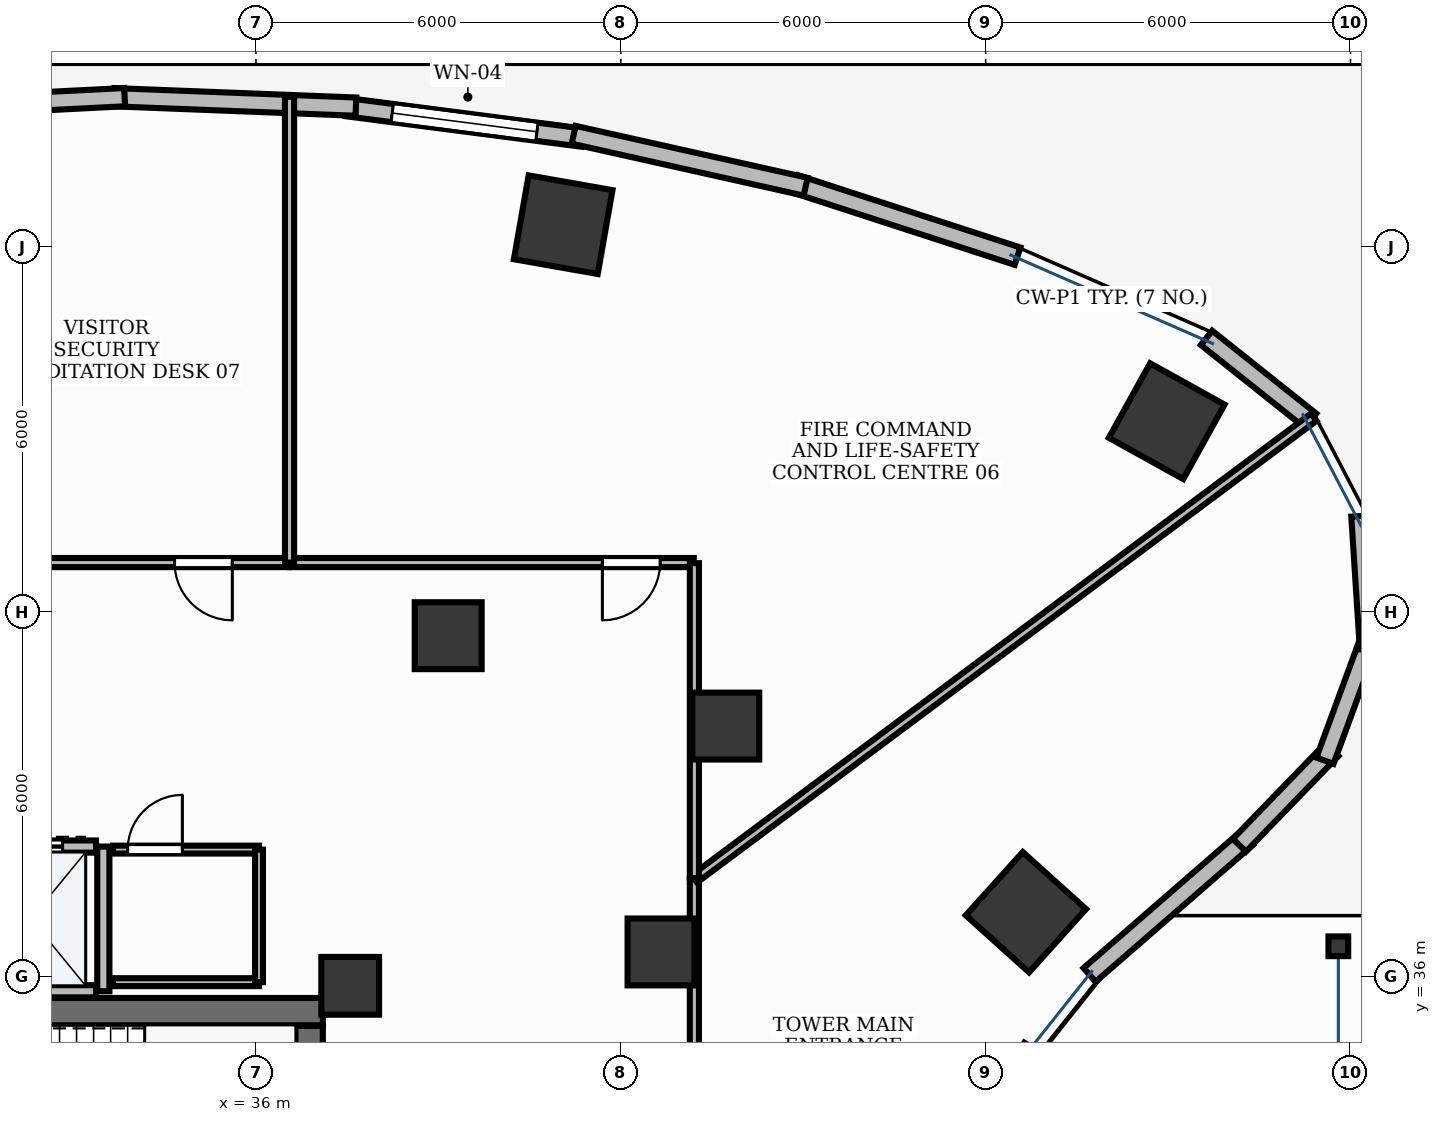
"""IFC4 building model, lengths in metres.
Left out: names, types, materials, properties, quantities, classifications, styles, units other than length and angle.
Written with IfcOpenShell. Run it as: python <this file> out.ifc"""

import sys

from ifc_helpers import new_model, si_unit, direction, frame, frame_2d, origin, origin_2d, place, context, subcontext, project, spatial, rectangle, hollow_circle, extrude, element, fill, save


model = new_model("IFC4")
c1 = context("Model", 3, precision=1e-05, world=origin(), true_north=direction((0.0, 1.0)))
c2 = subcontext(c1, "Body", "Model", "MODEL_VIEW")
j1 = project(units=[si_unit("LENGTHUNIT", "METRE"), si_unit("PLANEANGLEUNIT", "RADIAN")], contexts=[c1])
p1 = place(None, origin())
s1 = spatial("IfcSite", under=j1, at=p1, CompositionType="ELEMENT")
p2 = place(p1, origin())
s2 = spatial("IfcBuilding", under=s1, at=p2, CompositionType="ELEMENT")
p3 = place(p2, origin())
s3 = spatial("IfcBuildingStorey", under=s2, at=p3, CompositionType="ELEMENT", Elevation=0.0)
p4 = place(p3, frame((28.852, 35.425, 0.0), z_axis=(0.0, 0.0, 1.0), x_axis=(1.0, 0.0, 0.0)))
e1 = element("IfcWall", 1, at=p4, inside=s3, PredefinedType="SHEAR", context=c2, shape_type="SweptSolid", body=[
    extrude(rectangle(XDim=8.248, YDim=0.45, at=frame_2d((4.124, 0.0))), origin(), (0.0, 0.0, 1.0), 5.1),
])
p5 = place(p3, frame((36.875, 32.11, 0.0), z_axis=(0.0, 0.0, 1.0), x_axis=(0.0, 1.0, 0.0)))
e2 = element("IfcWall", 2, at=p5, inside=s3, PredefinedType="SHEAR", context=c2, shape_type="SweptSolid", body=[
    extrude(rectangle(XDim=3.08, YDim=0.45, at=frame_2d((1.54, 0.0))), origin(), (0.0, 0.0, 1.0), 5.1),
])
p6 = place(p3, frame((37.55, 35.85, -0.0), z_axis=(0.0, 0.0, 1.0), x_axis=(1.0, 0.0, 0.0)))
e3 = element("IfcColumn", 3, at=p6, inside=s3, PredefinedType="PILASTER", context=c2, shape_type="SweptSolid", body=[
    extrude(rectangle(XDim=0.95, YDim=0.95, at=origin_2d()), origin(), (0.0, 0.0, 1.0), 5.101),
])
p7 = place(p3, frame((50.977, 45.135, -0.0), z_axis=(0.0, 0.0, 1.0), x_axis=(-0.874535078577, 0.484962262797, 0.0)))
e4 = element("IfcColumn", 4, at=p7, inside=s3, PredefinedType="COLUMN", context=c2, shape_type="SweptSolid", body=[
    extrude(rectangle(XDim=1.4, YDim=1.4, at=origin_2d()), origin(), (0.0, 0.0, 1.0), 5.101),
])
p8 = place(p3, frame((43.727, 40.121, -0.0), z_axis=(0.0, 0.0, 1.0), x_axis=(1.0, 0.0, 0.0)))
e5 = element("IfcColumn", 5, at=p8, inside=s3, PredefinedType="COLUMN", context=c2, shape_type="SweptSolid", body=[
    extrude(rectangle(XDim=1.1, YDim=1.1, at=origin_2d()), origin(), (0.0, 0.0, 1.0), 5.101),
])
p9 = place(p3, frame((41.052, 48.367, -0.0), z_axis=(0.0, 0.0, 1.0), x_axis=(-0.984868307662, 0.173304404339, 0.0)))
e6 = element("IfcColumn", 6, at=p9, inside=s3, PredefinedType="COLUMN", context=c2, shape_type="SweptSolid", body=[
    extrude(rectangle(XDim=1.4, YDim=1.4, at=origin_2d()), origin(), (0.0, 0.0, 1.0), 5.101),
])
p10 = place(p3, frame((39.161, 41.608, -0.0), z_axis=(0.0, 0.0, 1.0), x_axis=(1.0, 0.0, 0.0)))
e7 = element("IfcColumn", 7, at=p10, inside=s3, PredefinedType="COLUMN", context=c2, shape_type="SweptSolid", body=[
    extrude(rectangle(XDim=1.1, YDim=1.1, at=origin_2d()), origin(), (0.0, 0.0, 1.0), 5.101),
])
p11 = place(p3, frame((48.662, 37.061, -0.0), z_axis=(0.0, 0.0, 1.0), x_axis=(0.669130606359, 0.743144825477, 0.0)))
e8 = element("IfcColumn", 8, at=p11, inside=s3, PredefinedType="COLUMN", context=c2, shape_type="SweptSolid", body=[
    extrude(rectangle(XDim=1.4, YDim=1.4, at=origin_2d()), origin(), (0.0, 0.0, 1.0), 5.101),
])
p12 = place(p3, frame((42.662, 36.407, -0.0), z_axis=(0.0, 0.0, 1.0), x_axis=(1.0, 0.0, 0.0)))
e9 = element("IfcColumn", 9, at=p12, inside=s3, PredefinedType="COLUMN", context=c2, shape_type="SweptSolid", body=[
    extrude(rectangle(XDim=1.1, YDim=1.1, at=origin_2d()), origin(), (0.0, 0.0, 1.0), 5.101),
])
p13 = place(p3, frame((53.8, 36.5, -0.0), z_axis=(0.0, 0.0, 1.0), x_axis=(1.0, 0.0, 0.0)))
e10 = element("IfcColumn", 10, at=p13, inside=s3, PredefinedType="COLUMN", context=c2, shape_type="SweptSolid", body=[
    extrude(hollow_circle(Radius=0.162, WallThickness=0.016, at=origin_2d()), origin(), (0.0, 0.0, 1.0), 5.081),
])
p14 = place(p3, frame((41.373, 49.798, 0.0), z_axis=(0.0, 0.0, 1.0), x_axis=(-0.991741322416, 0.128254237408, 0.0)))
e11 = element("IfcWall", 11, at=p14, inside=s3, PredefinedType="STANDARD", context=c2, shape_type="SweptSolid", body=[
    extrude(rectangle(XDim=3.916, YDim=0.3, at=frame_2d((1.958, 0.0))), origin(), (0.0, 0.0, 1.0), 5.1),
])
p15 = place(p14, frame((0.758, 0.0, 1.5)))
e12 = element("IfcOpeningElement", 12, at=p15, cuts=e11, PredefinedType="OPENING", context=c2, shape_type="SweptSolid", body=[
    extrude(rectangle(XDim=2.4, YDim=1.2, at=frame_2d((1.2, 0.6))), frame((0.0, 0.165, 0.0), z_axis=(0.0, -1.0, 0.0), x_axis=(1.0, 0.0, 0.0)), (0.0, 0.0, 1.0), 0.33),
])
p16 = place(p3, frame((48.525, 47.849, 0.0), z_axis=(0.0, 0.0, 1.0), x_axis=(-0.950965833732, 0.309295947393, 0.0)))
e13 = element("IfcWall", 13, at=p16, inside=s3, PredefinedType="STANDARD", context=c2, shape_type="SweptSolid", body=[
    extrude(rectangle(XDim=3.84, YDim=0.3, at=frame_2d((1.92, 0.0))), origin(), (0.0, 0.0, 1.0), 5.1),
])
p17 = place(p3, frame((45.04, 48.991, 0.0), z_axis=(0.0, 0.0, 1.0), x_axis=(-0.975868573345, 0.218358713032, 0.0)))
e14 = element("IfcWall", 14, at=p17, inside=s3, PredefinedType="STANDARD", context=c2, shape_type="SweptSolid", body=[
    extrude(rectangle(XDim=3.909, YDim=0.3, at=frame_2d((1.954, 0.0))), origin(), (0.0, 0.0, 1.0), 5.1),
])
p18 = place(p3, frame((37.644, 50.308, 0.0), z_axis=(0.0, 0.0, 1.0), x_axis=(-0.999245411623, 0.038840794937, 0.0)))
e15 = element("IfcWall", 15, at=p18, inside=s3, PredefinedType="STANDARD", context=c2, shape_type="SweptSolid", body=[
    extrude(rectangle(XDim=3.979, YDim=0.3, at=frame_2d((1.989, 0.0))), origin(), (0.0, 0.0, 1.0), 5.1),
])
p19 = place(p3, frame((33.84, 50.463, 0.0), z_axis=(0.0, 0.0, 1.0), x_axis=(-0.998732359232, -0.050335619826, 0.0)))
e16 = element("IfcWall", 16, at=p19, inside=s3, PredefinedType="STANDARD", context=c2, shape_type="SweptSolid", body=[
    extrude(rectangle(XDim=3.977, YDim=0.3, at=frame_2d((1.989, 0.0))), origin(), (0.0, 0.0, 1.0), 5.1),
])
p20 = place(p3, frame((47.825, 33.303, 0.0), z_axis=(0.0, 0.0, 1.0), x_axis=(0.522520662875, 0.852626622191, 0.0)))
e17 = element("IfcWall", 17, at=p20, inside=s3, PredefinedType="STANDARD", context=c2, shape_type="SweptSolid", body=[
    extrude(rectangle(XDim=1.798, YDim=0.3, at=frame_2d((0.899, 0.0))), origin(), (0.0, 0.0, 1.0), 5.1),
])
p21 = place(p3, frame((49.709, 36.029, 0.0), z_axis=(0.0, 0.0, 1.0), x_axis=(0.754746490246, 0.656016566454, 0.0)))
e18 = element("IfcWall", 18, at=p21, inside=s3, PredefinedType="STANDARD", context=c2, shape_type="SweptSolid", body=[
    extrude(rectangle(XDim=3.43, YDim=0.3, at=frame_2d((1.715, 0.0))), origin(), (0.0, 0.0, 1.0), 5.1),
])
p22 = place(p3, frame((52.173, 38.161, 0.0), z_axis=(0.0, 0.0, 1.0), x_axis=(0.695404695719, 0.718618333451, 0.0)))
e19 = element("IfcWall", 19, at=p22, inside=s3, PredefinedType="STANDARD", context=c2, shape_type="SweptSolid", body=[
    extrude(rectangle(XDim=2.188, YDim=0.3, at=frame_2d((1.094, 0.0))), origin(), (0.0, 0.0, 1.0), 5.1),
])
for number, where, z_axis, x_axis in (
    (20, (53.58, 39.552, 0.0), (0.0, 0.0, 1.0), (0.345, 0.939, 0.0)),
    (21, (54.304, 41.393, 0.0), (0.0, 0.0, 1.0), (-0.065, 0.998, 0.0)),
    (22, (53.344, 45.143, 0.0), (0.0, 0.0, 1.0), (-0.782, 0.623, 0.0)),
):
    element("IfcWall", number, at=place(p3, frame(where, z_axis=z_axis, x_axis=x_axis)), inside=s3, PredefinedType="STANDARD", context=c2, shape_type="SweptSolid", body=[
        extrude(rectangle(XDim=2.188, YDim=0.3, at=frame_2d((1.094, 0.0))), origin(), (0.0, 0.0, 1.0), 5.1),
    ])
p23 = place(p3, frame((33.49, 35.76, 0.0), z_axis=(0.0, 0.0, 1.0), x_axis=(0.0, 1.0, 0.0)))
e23 = element("IfcWall", 23, at=p23, inside=s3, PredefinedType="PARTITIONING", context=c2, shape_type="SweptSolid", body=[
    extrude(rectangle(XDim=2.38, YDim=0.2, at=frame_2d((1.19, 0.0))), origin(), (0.0, 0.0, 1.0), 4.11),
])
p24 = place(p3, frame((28.8, 35.76, 0.0), z_axis=(0.0, 0.0, 1.0), x_axis=(1.0, 0.0, 0.0)))
e24 = element("IfcWall", 24, at=p24, inside=s3, PredefinedType="PARTITIONING", context=c2, shape_type="SweptSolid", body=[
    extrude(rectangle(XDim=4.57, YDim=0.2, at=frame_2d((2.285, 0.0))), origin(), (0.0, 0.0, 1.0), 4.11),
])
p25 = place(p3, frame((28.8, 38.14, 0.0), z_axis=(0.0, 0.0, 1.0), x_axis=(1.0, 0.0, 0.0)))
e25 = element("IfcWall", 25, at=p25, inside=s3, PredefinedType="PARTITIONING", context=c2, shape_type="SweptSolid", body=[
    extrude(rectangle(XDim=4.57, YDim=0.2, at=frame_2d((2.285, 0.0))), origin(), (0.0, 0.0, 1.0), 4.11),
])
p26 = place(p25, frame((0.52, 0.0, 0.0)))
e26 = element("IfcOpeningElement", 26, at=p26, cuts=e25, PredefinedType="OPENING", context=c2, shape_type="SweptSolid", body=[
    extrude(rectangle(XDim=1.1, YDim=2.2, at=frame_2d((0.55, 1.1))), frame((0.0, 0.115, 0.0), z_axis=(0.0, -1.0, 0.0), x_axis=(1.0, 0.0, 0.0)), (0.0, 0.0, 1.0), 0.23),
])
p27 = place(p25, frame((2.92, 0.0, 0.0)))
e27 = element("IfcOpeningElement", 27, at=p27, cuts=e25, PredefinedType="OPENING", context=c2, shape_type="SweptSolid", body=[
    extrude(rectangle(XDim=1.1, YDim=2.2, at=frame_2d((0.55, 1.1))), frame((0.0, 0.115, 0.0), z_axis=(0.0, -1.0, 0.0), x_axis=(1.0, 0.0, 0.0)), (0.0, 0.0, 1.0), 0.23),
])
p28 = place(p3, frame((33.65, 38.09, 0.0), z_axis=(0.0, 0.0, 1.0), x_axis=(1.0, 0.0, 0.0)))
e28 = element("IfcWall", 28, at=p28, inside=s3, PredefinedType="PARTITIONING", context=c2, shape_type="SweptSolid", body=[
    extrude(rectangle(XDim=2.4, YDim=0.13, at=frame_2d((1.2, 0.0))), origin(), (0.0, 0.0, 1.0), 4.11),
])
p29 = place(p28, frame((0.24, 0.0, 0.0)))
e29 = element("IfcOpeningElement", 29, at=p29, cuts=e28, PredefinedType="OPENING", context=c2, shape_type="SweptSolid", body=[
    extrude(rectangle(XDim=0.9, YDim=2.15, at=frame_2d((0.45, 1.075))), frame((0.0, 0.08, 0.0), z_axis=(0.0, -1.0, 0.0), x_axis=(1.0, 0.0, 0.0)), (0.0, 0.0, 1.0), 0.16),
])
p30 = place(p3, frame((43.21, 23.61, 0.0), z_axis=(0.0, 0.0, 1.0), x_axis=(0.0, 1.0, 0.0)))
e30 = element("IfcWall", 30, at=p30, inside=s3, PredefinedType="PARTITIONING", context=c2, shape_type="SweptSolid", body=[
    extrude(rectangle(XDim=13.999, YDim=0.15, at=frame_2d((7.0, 0.0))), origin(), (0.0, 0.0, 1.0), 4.11),
])
p31 = place(p30, frame((6.622, 0.0, 0.0)))
e31 = element("IfcOpeningElement", 31, at=p31, cuts=e30, PredefinedType="OPENING", context=c2, shape_type="SweptSolid", body=[
    extrude(rectangle(XDim=0.95, YDim=2.15, at=frame_2d((0.475, 1.075))), frame((0.0, 0.09, 0.0), z_axis=(0.0, -1.0, 0.0), x_axis=(1.0, 0.0, 0.0)), (0.0, 0.0, 1.0), 0.18),
])
p32 = place(p3, frame((43.2, 42.81, 0.0), z_axis=(0.0, 0.0, 1.0), x_axis=(-1.0, 0.0, 0.0)))
e32 = element("IfcWall", 32, at=p32, inside=s3, PredefinedType="PARTITIONING", context=c2, shape_type="SweptSolid", body=[
    extrude(rectangle(XDim=6.648, YDim=0.15, at=frame_2d((3.324, 0.0))), origin(), (0.0, 0.0, 1.0), 4.11),
])
p33 = place(p32, frame((0.553, 0.0, 0.0)))
e33 = element("IfcOpeningElement", 33, at=p33, cuts=e32, PredefinedType="OPENING", context=c2, shape_type="SweptSolid", body=[
    extrude(rectangle(XDim=0.95, YDim=2.15, at=frame_2d((0.475, 1.075))), frame((0.0, 0.09, 0.0), z_axis=(0.0, -1.0, 0.0), x_axis=(1.0, 0.0, 0.0)), (0.0, 0.0, 1.0), 0.18),
])
p34 = place(p3, frame((36.542, 42.81, 0.0), z_axis=(0.0, 0.0, 1.0), x_axis=(-1.0, 0.0, 0.0)))
e34 = element("IfcWall", 34, at=p34, inside=s3, PredefinedType="PARTITIONING", context=c2, shape_type="SweptSolid", body=[
    extrude(rectangle(XDim=11.062, YDim=0.15, at=frame_2d((5.531, 0.0))), origin(), (0.0, 0.0, 1.0), 4.11),
])
p35 = place(p34, frame((0.931, 0.0, 0.0)))
e35 = element("IfcOpeningElement", 35, at=p35, cuts=e34, PredefinedType="OPENING", context=c2, shape_type="SweptSolid", body=[
    extrude(rectangle(XDim=0.95, YDim=2.15, at=frame_2d((0.475, 1.075))), frame((0.0, 0.09, 0.0), z_axis=(0.0, -1.0, 0.0), x_axis=(1.0, 0.0, 0.0)), (0.0, 0.0, 1.0), 0.18),
])
p36 = place(p3, frame((36.05, 35.91, 0.0), z_axis=(0.0, 0.0, 1.0), x_axis=(-1.0, 0.0, 0.0)))
e36 = element("IfcWall", 36, at=p36, inside=s3, PredefinedType="PARTITIONING", context=c2, shape_type="SweptSolid", body=[
    extrude(rectangle(XDim=2.4, YDim=0.13, at=frame_2d((1.2, 0.0))), origin(), (0.0, 0.0, 1.0), 4.11),
])
p37 = place(p3, frame((36.05, 38.09, 0.0), z_axis=(0.0, 0.0, 1.0), x_axis=(0.0, -1.0, 0.0)))
e37 = element("IfcWall", 37, at=p37, inside=s3, PredefinedType="PARTITIONING", context=c2, shape_type="SweptSolid", body=[
    extrude(rectangle(XDim=2.18, YDim=0.13, at=frame_2d((1.09, 0.0))), origin(), (0.0, 0.0, 1.0), 4.11),
])
p38 = place(p3, frame((43.21, 37.609, 0.0), z_axis=(0.0, 0.0, 1.0), x_axis=(0.801772318533, 0.597629608733, 0.0)))
e38 = element("IfcWall", 38, at=p38, inside=s3, PredefinedType="PARTITIONING", context=c2, shape_type="SweptSolid", body=[
    extrude(rectangle(XDim=12.703, YDim=0.15, at=frame_2d((6.352, 0.0))), origin(), (0.0, 0.0, 1.0), 4.11),
])
p39 = place(p3, frame((43.21, 37.622, 0.0), z_axis=(0.0, 0.0, 1.0), x_axis=(0.0, 1.0, 0.0)))
e39 = element("IfcWall", 39, at=p39, inside=s3, PredefinedType="PARTITIONING", context=c2, shape_type="SweptSolid", body=[
    extrude(rectangle(XDim=5.178, YDim=0.15, at=frame_2d((2.589, 0.0))), origin(), (0.0, 0.0, 1.0), 4.11),
])
p40 = place(p3, frame((36.552, 42.81, 0.0), z_axis=(0.0, 0.0, 1.0), x_axis=(0.0, 1.0, 0.0)))
e40 = element("IfcWall", 40, at=p40, inside=s3, PredefinedType="PARTITIONING", context=c2, shape_type="SweptSolid", body=[
    extrude(rectangle(XDim=7.66, YDim=0.15, at=frame_2d((3.83, 0.0))), origin(), (0.0, 0.0, 1.0), 4.11),
])
p41 = place(p15, origin())
e41 = element("IfcWindow", 41, at=p41, inside=s3, PartitioningType="DOUBLE_PANEL_HORIZONTAL", PredefinedType="WINDOW", context=c2, shape_type="SweptSolid", body=[
    extrude(rectangle(XDim=2.4, YDim=1.2, at=frame_2d((1.2, 0.6))), frame((0.0, 0.03, 0.0), z_axis=(0.0, -1.0, 0.0), x_axis=(1.0, 0.0, 0.0)), (0.0, 0.0, 1.0), 0.06),
])
fill(e12, e41)
p42 = place(p27, origin())
e42 = element("IfcDoor", 42, at=p42, inside=s3, OperationType="DOUBLE_DOOR_SLIDING", PredefinedType="DOOR", context=c2, shape_type="SweptSolid", body=[
    extrude(rectangle(XDim=1.1, YDim=2.2, at=frame_2d((0.55, 1.1))), frame((0.0, 0.025, 0.0), z_axis=(0.0, -1.0, 0.0), x_axis=(1.0, 0.0, 0.0)), (0.0, 0.0, 1.0), 0.05),
])
fill(e27, e42)
p43 = place(p29, origin())
e43 = element("IfcDoor", 43, at=p43, inside=s3, OperationType="SINGLE_SWING_RIGHT", PredefinedType="DOOR", context=c2, shape_type="SweptSolid", body=[
    extrude(rectangle(XDim=0.9, YDim=2.15, at=frame_2d((0.45, 1.075))), frame((0.0, 0.025, 0.0), z_axis=(0.0, -1.0, 0.0), x_axis=(1.0, 0.0, 0.0)), (0.0, 0.0, 1.0), 0.05),
])
fill(e29, e43)
p44 = place(p33, origin())
e44 = element("IfcDoor", 44, at=p44, inside=s3, OperationType="SINGLE_SWING_RIGHT", PredefinedType="DOOR", context=c2, shape_type="SweptSolid", body=[
    extrude(rectangle(XDim=0.95, YDim=2.15, at=frame_2d((0.475, 1.075))), frame((0.0, 0.025, 0.0), z_axis=(0.0, -1.0, 0.0), x_axis=(1.0, 0.0, 0.0)), (0.0, 0.0, 1.0), 0.05),
])
fill(e33, e44)
p45 = place(p35, origin())
e45 = element("IfcDoor", 45, at=p45, inside=s3, OperationType="SINGLE_SWING_LEFT", PredefinedType="DOOR", context=c2, shape_type="SweptSolid", body=[
    extrude(rectangle(XDim=0.95, YDim=2.15, at=frame_2d((0.475, 1.075))), frame((0.0, 0.025, 0.0), z_axis=(0.0, -1.0, 0.0), x_axis=(1.0, 0.0, 0.0)), (0.0, 0.0, 1.0), 0.05),
])
fill(e35, e45)
save(model, sys.argv[1])
